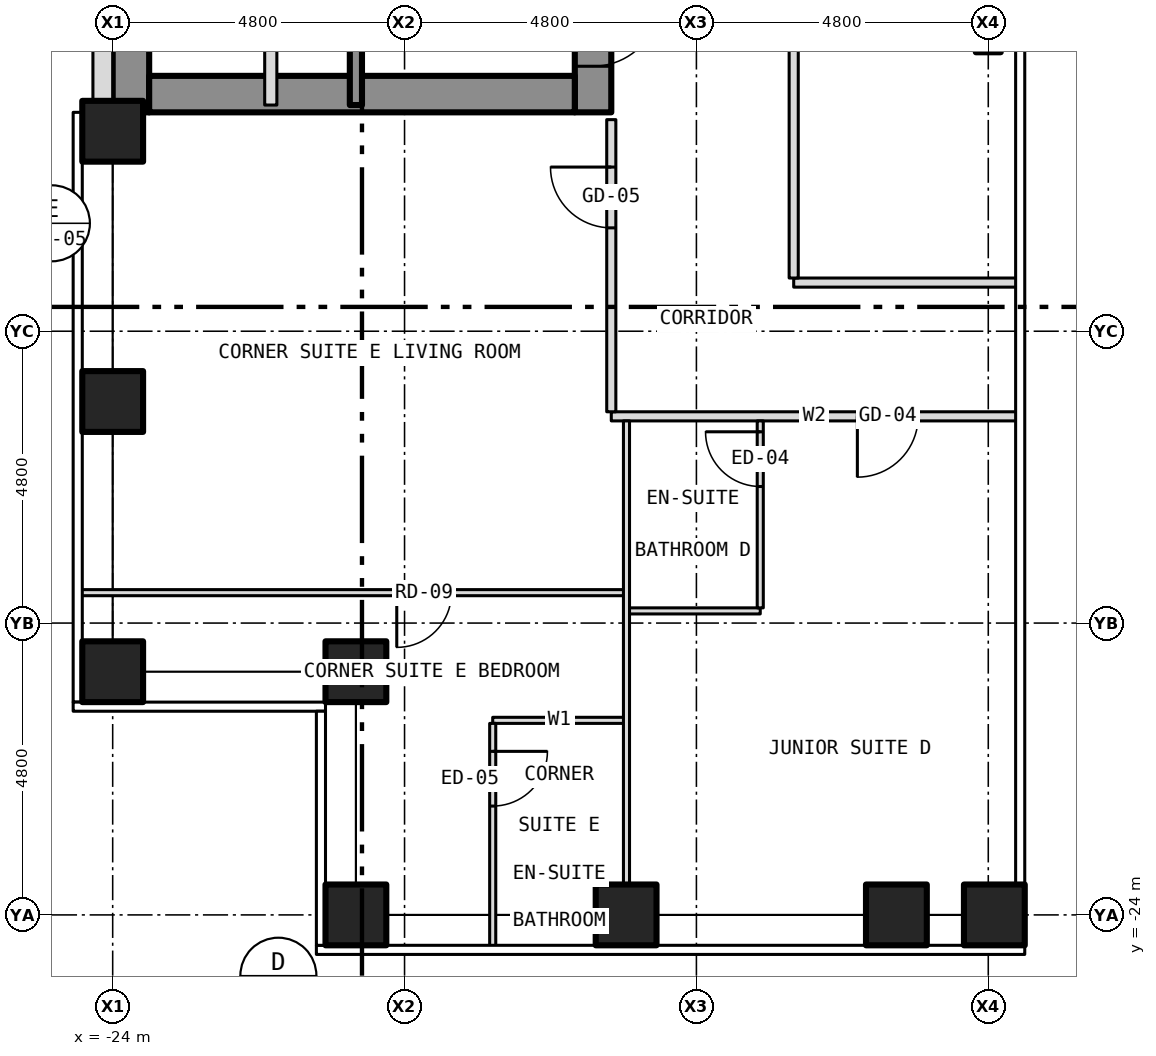
"""IFC4 building model, lengths in metres.
Left out: names, types, materials, properties, quantities, classifications, styles, units other than length and angle.
Written with IfcOpenShell. Run it as: python <this file> out.ifc"""

import sys

from ifc_helpers import new_model, si_unit, direction, frame, frame_2d, origin, origin_2d, place, context, subcontext, project, spatial, rectangle, hollow_rectangle, i_section, extrude, element, fill, save


model = new_model("IFC4")
c1 = context("Model", 3, precision=1e-05, world=origin(), true_north=direction((0.0, 1.0)))
c2 = subcontext(c1, "Body", "Model", "MODEL_VIEW")
j1 = project(units=[si_unit("LENGTHUNIT", "METRE"), si_unit("PLANEANGLEUNIT", "RADIAN")], contexts=[c1])
p1 = place(None, origin())
s1 = spatial("IfcSite", under=j1, at=p1, CompositionType="ELEMENT")
p2 = place(p1, origin())
s2 = spatial("IfcBuilding", under=s1, at=p2, CompositionType="ELEMENT")
p3 = place(p2, frame((0.0, 0.0, 74.0)))
s3 = spatial("IfcBuildingStorey", under=s2, at=p3, CompositionType="ELEMENT", Elevation=74.0)
for number, where, z_axis, x_axis in (
    (1, (-20.0, -24.0, -0.15), (0.0, 0.0, 1.0), (1.0, 0.0, 0.0)),
    (2, (-15.556, -24.0, -0.15), (0.0, 0.0, 1.0), (1.0, 0.0, 0.0)),
    (3, (-11.111, -24.0, -0.15), (0.0, 0.0, 1.0), (1.0, 0.0, 0.0)),
    (4, (-24.0, -20.0, -0.15), (0.0, 0.0, 1.0), (1.0, 0.0, 0.0)),
    (5, (-24.0, -15.556, -0.15), (0.0, 0.0, 1.0), (1.0, 0.0, 0.0)),
    (6, (-24.0, -11.111, -0.15), (0.0, 0.0, 1.0), (1.0, 0.0, 0.0)),
    (7, (-20.0, -20.0, -0.15), (0.0, 0.0, 1.0), (1.0, 0.0, 0.0)),
    (8, (-9.5, -24.0, -0.15), (0.0, 0.0, 1.0), (1.0, 0.0, 0.0)),
):
    element("IfcColumn", number, at=place(p3, frame(where, z_axis=z_axis, x_axis=x_axis)), inside=s3, PredefinedType="COLUMN", context=c2, shape_type="SweptSolid", body=[
        extrude(hollow_rectangle(XDim=1.0, YDim=1.0, WallThickness=0.06, at=origin_2d()), origin(), (0.0, 0.0, 1.0), 3.5),
    ])
p4 = place(p3, frame((-9.6, -9.6, -0.15), z_axis=(0.0, 0.0, 1.0), x_axis=(1.0, 0.0, 0.0)))
e9 = element("IfcColumn", 9, at=p4, inside=s3, PredefinedType="COLUMN", context=c2, shape_type="SweptSolid", body=[
    extrude(i_section(OverallWidth=0.409, OverallDepth=0.424, WebThickness=0.033, FlangeThickness=0.052, at=origin_2d()), origin(), (0.0, 0.0, 1.0), 3.5),
])
p5 = place(p3, frame((-16.1, -10.8, 0.0), z_axis=(0.0, 0.0, 1.0), x_axis=(0.0, 1.0, 0.0)))
e10 = element("IfcWall", 10, at=p5, inside=s3, PredefinedType="SHEAR", context=c2, shape_type="SweptSolid", body=[
    extrude(rectangle(XDim=21.6, YDim=0.6, at=frame_2d((10.8, 0.0))), origin(), (0.0, 0.0, 1.0), 3.25),
])
p6 = place(p5, frame((9.4, 0.0, 0.0)))
e11 = element("IfcOpeningElement", 11, at=p6, cuts=e10, PredefinedType="OPENING", context=c2, shape_type="SweptSolid", body=[
    extrude(rectangle(XDim=1.1, YDim=2.1, at=frame_2d((0.55, 1.05))), frame((0.0, 0.312, 0.0), z_axis=(0.0, -1.0, 0.0), x_axis=(1.0, 0.0, 0.0)), (0.0, 0.0, 1.0), 0.624),
])
p7 = place(p5, frame((11.5, 0.0, 0.0)))
e12 = element("IfcOpeningElement", 12, at=p7, cuts=e10, PredefinedType="OPENING", context=c2, shape_type="SweptSolid", body=[
    extrude(rectangle(XDim=1.1, YDim=2.1, at=frame_2d((0.55, 1.05))), frame((0.0, 0.312, 0.0), z_axis=(0.0, -1.0, 0.0), x_axis=(1.0, 0.0, 0.0)), (0.0, 0.0, 1.0), 0.624),
])
p8 = place(p5, frame((13.6, 0.0, 0.0)))
e13 = element("IfcOpeningElement", 13, at=p8, cuts=e10, PredefinedType="OPENING", context=c2, shape_type="SweptSolid", body=[
    extrude(rectangle(XDim=1.1, YDim=2.1, at=frame_2d((0.55, 1.05))), frame((0.0, 0.312, 0.0), z_axis=(0.0, -1.0, 0.0), x_axis=(1.0, 0.0, 0.0)), (0.0, 0.0, 1.0), 0.624),
])
p9 = place(p5, frame((15.7, 0.0, 0.0)))
e14 = element("IfcOpeningElement", 14, at=p9, cuts=e10, PredefinedType="OPENING", context=c2, shape_type="SweptSolid", body=[
    extrude(rectangle(XDim=1.1, YDim=2.1, at=frame_2d((0.55, 1.05))), frame((0.0, 0.312, 0.0), z_axis=(0.0, -1.0, 0.0), x_axis=(1.0, 0.0, 0.0)), (0.0, 0.0, 1.0), 0.624),
])
p10 = place(p5, frame((17.8, 0.0, 0.0)))
e15 = element("IfcOpeningElement", 15, at=p10, cuts=e10, PredefinedType="OPENING", context=c2, shape_type="SweptSolid", body=[
    extrude(rectangle(XDim=1.1, YDim=2.1, at=frame_2d((0.55, 1.05))), frame((0.0, 0.312, 0.0), z_axis=(0.0, -1.0, 0.0), x_axis=(1.0, 0.0, 0.0)), (0.0, 0.0, 1.0), 0.624),
])
p11 = place(p5, frame((0.758, 0.0, 0.0)))
e16 = element("IfcOpeningElement", 16, at=p11, cuts=e10, PredefinedType="OPENING", context=c2, shape_type="SweptSolid", body=[
    extrude(rectangle(XDim=1.1, YDim=2.1, at=frame_2d((0.55, 1.05))), frame((0.0, 0.312, 0.0), z_axis=(0.0, -1.0, 0.0), x_axis=(1.0, 0.0, 0.0)), (0.0, 0.0, 1.0), 0.624),
])
p12 = place(p5, frame((7.5, 0.0, 0.0)))
e17 = element("IfcOpeningElement", 17, at=p12, cuts=e10, PredefinedType="OPENING", context=c2, shape_type="SweptSolid", body=[
    extrude(rectangle(XDim=1.1, YDim=2.1, at=frame_2d((0.55, 1.05))), frame((0.0, 0.312, 0.0), z_axis=(0.0, -1.0, 0.0), x_axis=(1.0, 0.0, 0.0)), (0.0, 0.0, 1.0), 0.624),
])
p13 = place(p3, frame((-23.7, -10.8, 0.0), z_axis=(0.0, 0.0, 1.0), x_axis=(0.0, 1.0, 0.0)))
e18 = element("IfcWall", 18, at=p13, inside=s3, PredefinedType="SHEAR", context=c2, shape_type="SweptSolid", body=[
    extrude(rectangle(XDim=21.6, YDim=0.6, at=frame_2d((10.8, 0.0))), origin(), (0.0, 0.0, 1.0), 3.25),
])
p14 = place(p3, frame((-23.4, -10.5, 0.0), z_axis=(0.0, 0.0, 1.0), x_axis=(1.0, 0.0, 0.0)))
e19 = element("IfcWall", 19, at=p14, inside=s3, PredefinedType="SHEAR", context=c2, shape_type="SweptSolid", body=[
    extrude(rectangle(XDim=7.0, YDim=0.6, at=frame_2d((3.5, 0.0))), origin(), (0.0, 0.0, 1.0), 3.25),
])
p15 = place(p3, frame((-24.163, 10.8, 0.0), z_axis=(0.0, 0.0, 1.0), x_axis=(0.0, -1.0, 0.0)))
e20 = element("IfcWall", 20, at=p15, inside=s3, PredefinedType="SOLIDWALL", context=c2, shape_type="SweptSolid", body=[
    extrude(rectangle(XDim=21.6, YDim=0.325, at=frame_2d((10.8, 0.0))), origin(), (0.0, 0.0, 1.0), 3.5),
])
p16 = place(p15, frame((18.05, 0.0, 1.0)))
e21 = element("IfcOpeningElement", 21, at=p16, cuts=e20, PredefinedType="OPENING", context=c2, shape_type="SweptSolid", body=[
    extrude(rectangle(XDim=0.6, YDim=1.5, at=frame_2d((0.3, 0.75))), frame((0.0, 0.175, 0.0), z_axis=(0.0, -1.0, 0.0), x_axis=(1.0, 0.0, 0.0)), (0.0, 0.0, 1.0), 0.349),
])
for number, where, z_axis, x_axis in (
    (22, (-17.75, -20.8, 0.0), (0.0, 0.0, 1.0), (1.0, 0.0, 0.0)),
    (23, (-15.55, -19.0, 0.0), (0.0, 0.0, 1.0), (1.0, 0.0, 0.0)),
):
    element("IfcWall", number, at=place(p3, frame(where, z_axis=z_axis, x_axis=x_axis)), inside=s3, PredefinedType="PARTITIONING", context=c2, shape_type="SweptSolid", body=[
        extrude(rectangle(XDim=2.2, YDim=0.1, at=frame_2d((1.1, 0.0))), origin(), (0.0, 0.0, 1.0), 3.35),
    ])
p17 = place(p3, frame((-24.53, -18.7, 0.0), z_axis=(0.0, 0.0, 1.0), x_axis=(1.0, 0.0, 0.0)))
e24 = element("IfcWall", 24, at=p17, inside=s3, PredefinedType="PARTITIONING", context=c2, shape_type="SweptSolid", body=[
    extrude(rectangle(XDim=8.98, YDim=0.1, at=frame_2d((4.49, 0.0))), origin(), (0.0, 0.0, 1.0), 3.35),
])
p18 = place(p17, frame((5.202, 0.0, 0.0)))
e25 = element("IfcOpeningElement", 25, at=p18, cuts=e24, PredefinedType="OPENING", context=c2, shape_type="SweptSolid", body=[
    extrude(rectangle(XDim=0.9, YDim=2.1, at=frame_2d((0.45, 1.05))), frame((0.0, 0.062, 0.0), z_axis=(0.0, -1.0, 0.0), x_axis=(1.0, 0.0, 0.0)), (0.0, 0.0, 1.0), 0.124),
])
p19 = place(p3, frame((-15.8, -15.8, 0.0), z_axis=(0.0, 0.0, 1.0), x_axis=(1.0, 0.0, 0.0)))
e26 = element("IfcWall", 26, at=p19, inside=s3, PredefinedType="PARTITIONING", context=c2, shape_type="SweptSolid", body=[
    extrude(rectangle(XDim=6.68, YDim=0.15, at=frame_2d((3.34, 0.0))), origin(), (0.0, 0.0, 1.0), 3.35),
])
p20 = place(p19, frame((4.047, 0.0, 0.0)))
e27 = element("IfcOpeningElement", 27, at=p20, cuts=e26, PredefinedType="OPENING", context=c2, shape_type="SweptSolid", body=[
    extrude(rectangle(XDim=1.0, YDim=2.1, at=frame_2d((0.5, 1.05))), frame((0.0, 0.087, 0.0), z_axis=(0.0, -1.0, 0.0), x_axis=(1.0, 0.0, 0.0)), (0.0, 0.0, 1.0), 0.174),
])
p21 = place(p3, frame((-12.8, -13.6, 0.0), z_axis=(0.0, 0.0, 1.0), x_axis=(1.0, 0.0, 0.0)))
e28 = element("IfcWall", 28, at=p21, inside=s3, PredefinedType="PARTITIONING", context=c2, shape_type="SweptSolid", body=[
    extrude(rectangle(XDim=3.68, YDim=0.15, at=frame_2d((1.84, 0.0))), origin(), (0.0, 0.0, 1.0), 3.35),
])
p22 = place(p3, frame((-21.4, -10.68, 0.0), z_axis=(0.0, 0.0, 1.0), x_axis=(0.0, 1.0, 0.0)))
e29 = element("IfcWall", 29, at=p22, inside=s3, PredefinedType="PARTITIONING", context=c2, shape_type="SweptSolid", body=[
    extrude(rectangle(XDim=8.68, YDim=0.2, at=frame_2d((4.34, 0.0))), origin(), (0.0, 0.0, 1.0), 3.25),
])
p23 = place(p22, frame((1.21, 0.0, 0.0)))
e30 = element("IfcOpeningElement", 30, at=p23, cuts=e29, PredefinedType="OPENING", context=c2, shape_type="SweptSolid", body=[
    extrude(rectangle(XDim=0.9, YDim=2.1, at=frame_2d((0.45, 1.05))), frame((0.0, 0.112, 0.0), z_axis=(0.0, -1.0, 0.0), x_axis=(1.0, 0.0, 0.0)), (0.0, 0.0, 1.0), 0.224),
])
p24 = place(p22, frame((5.66, 0.0, 0.0)))
e31 = element("IfcOpeningElement", 31, at=p24, cuts=e29, PredefinedType="OPENING", context=c2, shape_type="SweptSolid", body=[
    extrude(rectangle(XDim=0.9, YDim=2.1, at=frame_2d((0.45, 1.05))), frame((0.0, 0.112, 0.0), z_axis=(0.0, -1.0, 0.0), x_axis=(1.0, 0.0, 0.0)), (0.0, 0.0, 1.0), 0.224),
])
p25 = place(p3, frame((-20.0, -10.68, 0.0), z_axis=(0.0, 0.0, 1.0), x_axis=(0.0, 1.0, 0.0)))
e32 = element("IfcWall", 32, at=p25, inside=s3, PredefinedType="SHEAR", context=c2, shape_type="SweptSolid", body=[
    extrude(rectangle(XDim=6.98, YDim=0.2, at=frame_2d((3.49, 0.0))), origin(), (0.0, 0.0, 1.0), 3.25),
])
p26 = place(p3, frame((-17.75, -24.53, 0.0), z_axis=(0.0, 0.0, 1.0), x_axis=(0.0, 1.0, 0.0)))
e33 = element("IfcWall", 33, at=p26, inside=s3, PredefinedType="PARTITIONING", context=c2, shape_type="SweptSolid", body=[
    extrude(rectangle(XDim=3.68, YDim=0.1, at=frame_2d((1.84, 0.0))), origin(), (0.0, 0.0, 1.0), 3.35),
])
p27 = place(p26, frame((2.32, 0.0, 0.0)))
e34 = element("IfcOpeningElement", 34, at=p27, cuts=e33, PredefinedType="OPENING", context=c2, shape_type="SweptSolid", body=[
    extrude(rectangle(XDim=0.9, YDim=2.1, at=frame_2d((0.45, 1.05))), frame((0.0, 0.062, 0.0), z_axis=(0.0, -1.0, 0.0), x_axis=(1.0, 0.0, 0.0)), (0.0, 0.0, 1.0), 0.124),
])
p28 = place(p3, frame((-15.8, -15.725, 0.0), z_axis=(0.0, 0.0, 1.0), x_axis=(0.0, 1.0, 0.0)))
e35 = element("IfcWall", 35, at=p28, inside=s3, PredefinedType="PARTITIONING", context=c2, shape_type="SweptSolid", body=[
    extrude(rectangle(XDim=4.805, YDim=0.15, at=frame_2d((2.403, 0.0))), origin(), (0.0, 0.0, 1.0), 3.35),
])
p29 = place(p28, frame((3.025, 0.0, 0.0)))
e36 = element("IfcOpeningElement", 36, at=p29, cuts=e35, PredefinedType="OPENING", context=c2, shape_type="SweptSolid", body=[
    extrude(rectangle(XDim=1.0, YDim=2.1, at=frame_2d((0.5, 1.05))), frame((0.0, 0.087, 0.0), z_axis=(0.0, -1.0, 0.0), x_axis=(1.0, 0.0, 0.0)), (0.0, 0.0, 1.0), 0.174),
])
p30 = place(p3, frame((-15.55, -23.88, 0.0), z_axis=(0.0, 0.0, 1.0), x_axis=(0.0, 1.0, 0.0)))
e37 = element("IfcWall", 37, at=p30, inside=s3, PredefinedType="PARTITIONING", context=c2, shape_type="SweptSolid", body=[
    extrude(rectangle(XDim=8.005, YDim=0.1, at=frame_2d((4.002, 0.0))), origin(), (0.0, 0.0, 1.0), 3.35),
])
p31 = place(p3, frame((-13.35, -18.95, 0.0), z_axis=(0.0, 0.0, 1.0), x_axis=(0.0, 1.0, 0.0)))
e38 = element("IfcWall", 38, at=p31, inside=s3, PredefinedType="PARTITIONING", context=c2, shape_type="SweptSolid", body=[
    extrude(rectangle(XDim=3.075, YDim=0.1, at=frame_2d((1.538, 0.0))), origin(), (0.0, 0.0, 1.0), 3.35),
])
p32 = place(p31, frame((1.996, 0.0, 0.0)))
e39 = element("IfcOpeningElement", 39, at=p32, cuts=e38, PredefinedType="OPENING", context=c2, shape_type="SweptSolid", body=[
    extrude(rectangle(XDim=0.9, YDim=2.1, at=frame_2d((0.45, 1.05))), frame((0.0, 0.062, 0.0), z_axis=(0.0, -1.0, 0.0), x_axis=(1.0, 0.0, 0.0)), (0.0, 0.0, 1.0), 0.124),
])
p33 = place(p3, frame((-12.8, -13.525, 0.0), z_axis=(0.0, 0.0, 1.0), x_axis=(0.0, 1.0, 0.0)))
e40 = element("IfcWall", 40, at=p33, inside=s3, PredefinedType="PARTITIONING", context=c2, shape_type="SweptSolid", body=[
    extrude(rectangle(XDim=11.525, YDim=0.15, at=frame_2d((5.762, 0.0))), origin(), (0.0, 0.0, 1.0), 3.35),
])
p34 = place(p33, frame((6.725, 0.0, 0.0)))
e41 = element("IfcOpeningElement", 41, at=p34, cuts=e40, PredefinedType="OPENING", context=c2, shape_type="SweptSolid", body=[
    extrude(rectangle(XDim=0.9, YDim=2.1, at=frame_2d((0.45, 1.05))), frame((0.0, 0.087, 0.0), z_axis=(0.0, -1.0, 0.0), x_axis=(1.0, 0.0, 0.0)), (0.0, 0.0, 1.0), 0.174),
])
p35 = place(p11, origin())
e42 = element("IfcDoor", 42, at=p35, inside=s3, OperationType="SINGLE_SWING_RIGHT", PredefinedType="DOOR", context=c2, shape_type="SweptSolid", body=[
    extrude(rectangle(XDim=1.1, YDim=2.1, at=frame_2d((0.55, 1.05))), frame((0.0, 0.025, 0.0), z_axis=(0.0, -1.0, 0.0), x_axis=(1.0, 0.0, 0.0)), (0.0, 0.0, 1.0), 0.05),
])
fill(e16, e42)
p36 = place(p20, origin())
e43 = element("IfcDoor", 43, at=p36, inside=s3, OperationType="SINGLE_SWING_LEFT", PredefinedType="DOOR", context=c2, shape_type="SweptSolid", body=[
    extrude(rectangle(XDim=1.0, YDim=2.1, at=frame_2d((0.5, 1.05))), frame((0.0, 0.025, 0.0), z_axis=(0.0, -1.0, 0.0), x_axis=(1.0, 0.0, 0.0)), (0.0, 0.0, 1.0), 0.05),
])
fill(e27, e43)
p37 = place(p32, origin())
e44 = element("IfcDoor", 44, at=p37, inside=s3, OperationType="SINGLE_SWING_RIGHT", PredefinedType="DOOR", context=c2, shape_type="SweptSolid", body=[
    extrude(rectangle(XDim=0.9, YDim=2.1, at=frame_2d((0.45, 1.05))), frame((0.0, 0.025, 0.0), z_axis=(0.0, -1.0, 0.0), x_axis=(1.0, 0.0, 0.0)), (0.0, 0.0, 1.0), 0.05),
])
fill(e39, e44)
p38 = place(p29, origin())
e45 = element("IfcDoor", 45, at=p38, inside=s3, OperationType="SINGLE_SWING_RIGHT", PredefinedType="DOOR", context=c2, shape_type="SweptSolid", body=[
    extrude(rectangle(XDim=1.0, YDim=2.1, at=frame_2d((0.5, 1.05))), frame((0.0, 0.025, 0.0), z_axis=(0.0, -1.0, 0.0), x_axis=(1.0, 0.0, 0.0)), (0.0, 0.0, 1.0), 0.05),
])
fill(e36, e45)
p39 = place(p18, origin())
e46 = element("IfcDoor", 46, at=p39, inside=s3, OperationType="SINGLE_SWING_LEFT", PredefinedType="DOOR", context=c2, shape_type="SweptSolid", body=[
    extrude(rectangle(XDim=0.9, YDim=2.1, at=frame_2d((0.45, 1.05))), frame((0.0, 0.025, 0.0), z_axis=(0.0, -1.0, 0.0), x_axis=(1.0, 0.0, 0.0)), (0.0, 0.0, 1.0), 0.05),
])
fill(e25, e46)
p40 = place(p27, origin())
e47 = element("IfcDoor", 47, at=p40, inside=s3, OperationType="SINGLE_SWING_RIGHT", PredefinedType="DOOR", context=c2, shape_type="SweptSolid", body=[
    extrude(rectangle(XDim=0.9, YDim=2.1, at=frame_2d((0.45, 1.05))), frame((0.0, 0.025, 0.0), z_axis=(0.0, -1.0, 0.0), x_axis=(1.0, 0.0, 0.0)), (0.0, 0.0, 1.0), 0.05),
])
fill(e34, e47)
save(model, sys.argv[1])
